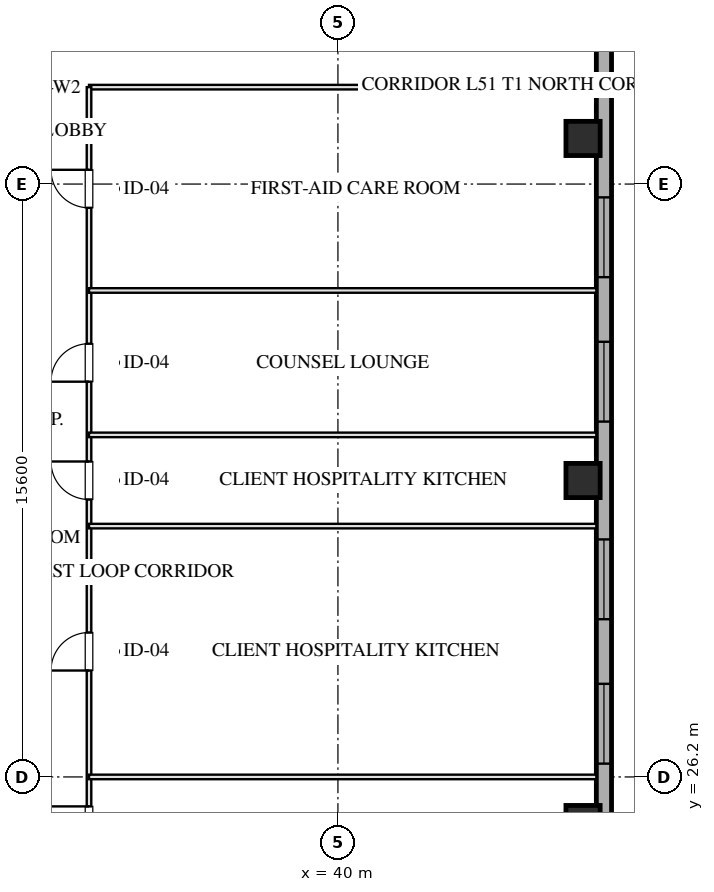
"""IFC4 building model, lengths in metres.
Left out: names, types, materials, properties, quantities, classifications, styles, units other than length and angle.
Written with IfcOpenShell. Run it as: python <this file> out.ifc"""

import sys

from ifc_helpers import new_model, si_unit, direction, frame, frame_2d, origin, origin_2d, place, context, subcontext, project, spatial, rectangle, hollow_rectangle, extrude, element, fill, save


model = new_model("IFC4")
c1 = context("Model", 3, precision=1e-05, world=origin(), true_north=direction((0.0, 1.0)))
c2 = subcontext(c1, "Body", "Model", "MODEL_VIEW")
j1 = project(units=[si_unit("LENGTHUNIT", "METRE"), si_unit("PLANEANGLEUNIT", "RADIAN")], contexts=[c1])
p1 = place(None, origin())
s1 = spatial("IfcSite", under=j1, at=p1, CompositionType="ELEMENT")
p2 = place(p1, origin())
s2 = spatial("IfcBuilding", under=s1, at=p2, CompositionType="ELEMENT")
p3 = place(p2, frame((0.0, 0.0, 192.05)))
s3 = spatial("IfcBuildingStorey", under=s2, at=p3, CompositionType="ELEMENT", Elevation=192.05)
for number, where, z_axis, x_axis in (
    (1, (46.45, 25.0, 0.0), (0.0, 0.0, 1.0), (1.0, 0.0, 0.0)),
    (2, (46.45, 34.0, 0.0), (0.0, 0.0, 1.0), (1.0, 0.0, 0.0)),
    (3, (46.45, 43.0, 0.0), (0.0, 0.0, 1.0), (1.0, 0.0, 0.0)),
):
    element("IfcColumn", number, at=place(p3, frame(where, z_axis=z_axis, x_axis=x_axis)), inside=s3, PredefinedType="COLUMN", context=c2, shape_type="SweptSolid", body=[
        extrude(hollow_rectangle(XDim=0.9, YDim=0.9, WallThickness=0.032, at=origin_2d()), origin(), (0.0, 0.0, 1.0), 3.451),
    ])
p4 = place(p3, frame((47.0, 57.2, 0.0), z_axis=(0.0, 0.0, 1.0), x_axis=(0.0, -1.0, 0.0)))
e4 = element("IfcWall", 4, at=p4, inside=s3, PredefinedType="SOLIDWALL", context=c2, shape_type="SweptSolid", body=[
    extrude(rectangle(XDim=46.4, YDim=0.4, at=frame_2d((23.2, 0.0))), origin(), (0.0, 0.0, 1.0), 2.61),
])
p5 = place(p4, frame((28.55, 0.0, 0.75)))
e5 = element("IfcOpeningElement", 5, at=p5, cuts=e4, PredefinedType="OPENING", context=c2, shape_type="SweptSolid", body=[
    extrude(rectangle(XDim=2.1, YDim=1.46, at=frame_2d((1.05, 0.73))), frame((0.0, 0.21, 0.0), z_axis=(0.0, -1.0, 0.0), x_axis=(1.0, 0.0, 0.0)), (0.0, 0.0, 1.0), 0.42),
])
p6 = place(p4, frame((24.75, 0.0, 0.75)))
e6 = element("IfcOpeningElement", 6, at=p6, cuts=e4, PredefinedType="OPENING", context=c2, shape_type="SweptSolid", body=[
    extrude(rectangle(XDim=2.1, YDim=1.46, at=frame_2d((1.05, 0.73))), frame((0.0, 0.21, 0.0), z_axis=(0.0, -1.0, 0.0), x_axis=(1.0, 0.0, 0.0)), (0.0, 0.0, 1.0), 0.42),
])
p7 = place(p4, frame((19.55, 0.0, 0.75)))
e7 = element("IfcOpeningElement", 7, at=p7, cuts=e4, PredefinedType="OPENING", context=c2, shape_type="SweptSolid", body=[
    extrude(rectangle(XDim=2.1, YDim=1.46, at=frame_2d((1.05, 0.73))), frame((0.0, 0.21, 0.0), z_axis=(0.0, -1.0, 0.0), x_axis=(1.0, 0.0, 0.0)), (0.0, 0.0, 1.0), 0.42),
])
p8 = place(p4, frame((15.75, 0.0, 0.75)))
e8 = element("IfcOpeningElement", 8, at=p8, cuts=e4, PredefinedType="OPENING", context=c2, shape_type="SweptSolid", body=[
    extrude(rectangle(XDim=2.1, YDim=1.46, at=frame_2d((1.05, 0.73))), frame((0.0, 0.21, 0.0), z_axis=(0.0, -1.0, 0.0), x_axis=(1.0, 0.0, 0.0)), (0.0, 0.0, 1.0), 0.42),
])
p9 = place(p3, frame((33.45, 44.35, 0.0), z_axis=(0.0, 0.0, 1.0), x_axis=(1.0, 0.0, 0.0)))
e9 = element("IfcWall", 9, at=p9, inside=s3, PredefinedType="PARTITIONING", context=c2, shape_type="SweptSolid", body=[
    extrude(rectangle(XDim=13.35, YDim=0.12, at=frame_2d((6.675, 0.0))), origin(), (0.0, 0.0, 1.0), 3.175),
])
p10 = place(p3, frame((33.45, 23.65, 0.0), z_axis=(0.0, 0.0, 1.0), x_axis=(0.0, 1.0, 0.0)))
e10 = element("IfcWall", 10, at=p10, inside=s3, PredefinedType="PARTITIONING", context=c2, shape_type="SweptSolid", body=[
    extrude(rectangle(XDim=20.7, YDim=0.12, at=frame_2d((10.35, 0.0))), origin(), (0.0, 0.0, 1.0), 3.175),
])
p11 = place(p10, frame((0.775, 0.0, 0.0)))
e11 = element("IfcOpeningElement", 11, at=p11, cuts=e10, PredefinedType="OPENING", context=c2, shape_type="SweptSolid", body=[
    extrude(rectangle(XDim=1.0, YDim=2.05, at=frame_2d((0.5, 1.025))), frame((0.0, 0.07, 0.0), z_axis=(0.0, -1.0, 0.0), x_axis=(1.0, 0.0, 0.0)), (0.0, 0.0, 1.0), 0.14),
])
p12 = place(p10, frame((5.35, 0.0, 0.0)))
e12 = element("IfcOpeningElement", 12, at=p12, cuts=e10, PredefinedType="OPENING", context=c2, shape_type="SweptSolid", body=[
    extrude(rectangle(XDim=1.0, YDim=2.05, at=frame_2d((0.5, 1.025))), frame((0.0, 0.07, 0.0), z_axis=(0.0, -1.0, 0.0), x_axis=(1.0, 0.0, 0.0)), (0.0, 0.0, 1.0), 0.14),
])
p13 = place(p10, frame((9.85, 0.0, 0.0)))
e13 = element("IfcOpeningElement", 13, at=p13, cuts=e10, PredefinedType="OPENING", context=c2, shape_type="SweptSolid", body=[
    extrude(rectangle(XDim=1.0, YDim=2.05, at=frame_2d((0.5, 1.025))), frame((0.0, 0.07, 0.0), z_axis=(0.0, -1.0, 0.0), x_axis=(1.0, 0.0, 0.0)), (0.0, 0.0, 1.0), 0.14),
])
p14 = place(p10, frame((12.95, 0.0, 0.0)))
e14 = element("IfcOpeningElement", 14, at=p14, cuts=e10, PredefinedType="OPENING", context=c2, shape_type="SweptSolid", body=[
    extrude(rectangle(XDim=1.0, YDim=2.05, at=frame_2d((0.5, 1.025))), frame((0.0, 0.07, 0.0), z_axis=(0.0, -1.0, 0.0), x_axis=(1.0, 0.0, 0.0)), (0.0, 0.0, 1.0), 0.14),
])
p15 = place(p10, frame((17.525, 0.0, 0.0)))
e15 = element("IfcOpeningElement", 15, at=p15, cuts=e10, PredefinedType="OPENING", context=c2, shape_type="SweptSolid", body=[
    extrude(rectangle(XDim=1.0, YDim=2.05, at=frame_2d((0.5, 1.025))), frame((0.0, 0.07, 0.0), z_axis=(0.0, -1.0, 0.0), x_axis=(1.0, 0.0, 0.0)), (0.0, 0.0, 1.0), 0.14),
])
for number, where, z_axis, x_axis in (
    (16, (33.45, 26.2, 0.0), (0.0, 0.0, 1.0), (1.0, 0.0, 0.0)),
    (17, (33.45, 32.8, 0.0), (0.0, 0.0, 1.0), (1.0, 0.0, 0.0)),
    (18, (33.45, 35.2, 0.0), (0.0, 0.0, 1.0), (1.0, 0.0, 0.0)),
    (19, (33.45, 39.0, 0.0), (0.0, 0.0, 1.0), (1.0, 0.0, 0.0)),
):
    element("IfcWall", number, at=place(p3, frame(where, z_axis=z_axis, x_axis=x_axis)), inside=s3, PredefinedType="PARTITIONING", context=c2, shape_type="SweptSolid", body=[
        extrude(rectangle(XDim=13.35, YDim=0.12, at=frame_2d((6.675, 0.0))), origin(), (0.0, 0.0, 1.0), 3.175),
    ])
p16 = place(p5, origin())
e20 = element("IfcWindow", 20, at=p16, inside=s3, PartitioningType="TRIPLE_PANEL_VERTICAL", PredefinedType="WINDOW", context=c2, shape_type="SweptSolid", body=[
    extrude(rectangle(XDim=2.1, YDim=1.46, at=frame_2d((1.05, 0.73))), frame((0.0, 0.03, 0.0), z_axis=(0.0, -1.0, 0.0), x_axis=(1.0, 0.0, 0.0)), (0.0, 0.0, 1.0), 0.06),
])
fill(e5, e20)
p17 = place(p6, origin())
e21 = element("IfcWindow", 21, at=p17, inside=s3, PartitioningType="TRIPLE_PANEL_VERTICAL", PredefinedType="WINDOW", context=c2, shape_type="SweptSolid", body=[
    extrude(rectangle(XDim=2.1, YDim=1.46, at=frame_2d((1.05, 0.73))), frame((0.0, 0.03, 0.0), z_axis=(0.0, -1.0, 0.0), x_axis=(1.0, 0.0, 0.0)), (0.0, 0.0, 1.0), 0.06),
])
fill(e6, e21)
p18 = place(p7, origin())
e22 = element("IfcWindow", 22, at=p18, inside=s3, PartitioningType="TRIPLE_PANEL_VERTICAL", PredefinedType="WINDOW", context=c2, shape_type="SweptSolid", body=[
    extrude(rectangle(XDim=2.1, YDim=1.46, at=frame_2d((1.05, 0.73))), frame((0.0, 0.03, 0.0), z_axis=(0.0, -1.0, 0.0), x_axis=(1.0, 0.0, 0.0)), (0.0, 0.0, 1.0), 0.06),
])
fill(e7, e22)
p19 = place(p8, origin())
e23 = element("IfcWindow", 23, at=p19, inside=s3, PartitioningType="TRIPLE_PANEL_VERTICAL", PredefinedType="WINDOW", context=c2, shape_type="SweptSolid", body=[
    extrude(rectangle(XDim=2.1, YDim=1.46, at=frame_2d((1.05, 0.73))), frame((0.0, 0.03, 0.0), z_axis=(0.0, -1.0, 0.0), x_axis=(1.0, 0.0, 0.0)), (0.0, 0.0, 1.0), 0.06),
])
fill(e8, e23)
p20 = place(p11, origin())
e24 = element("IfcDoor", 24, at=p20, inside=s3, OperationType="SINGLE_SWING_RIGHT", PredefinedType="DOOR", context=c2, shape_type="SweptSolid", body=[
    extrude(rectangle(XDim=1.0, YDim=2.05, at=frame_2d((0.5, 1.025))), frame((0.0, 0.025, 0.0), z_axis=(0.0, -1.0, 0.0), x_axis=(1.0, 0.0, 0.0)), (0.0, 0.0, 1.0), 0.05),
])
fill(e11, e24)
p21 = place(p12, origin())
e25 = element("IfcDoor", 25, at=p21, inside=s3, OperationType="SINGLE_SWING_LEFT", PredefinedType="DOOR", context=c2, shape_type="SweptSolid", body=[
    extrude(rectangle(XDim=1.0, YDim=2.05, at=frame_2d((0.5, 1.025))), frame((0.0, 0.025, 0.0), z_axis=(0.0, -1.0, 0.0), x_axis=(1.0, 0.0, 0.0)), (0.0, 0.0, 1.0), 0.05),
])
fill(e12, e25)
p22 = place(p13, origin())
e26 = element("IfcDoor", 26, at=p22, inside=s3, OperationType="SINGLE_SWING_RIGHT", PredefinedType="DOOR", context=c2, shape_type="SweptSolid", body=[
    extrude(rectangle(XDim=1.0, YDim=2.05, at=frame_2d((0.5, 1.025))), frame((0.0, 0.025, 0.0), z_axis=(0.0, -1.0, 0.0), x_axis=(1.0, 0.0, 0.0)), (0.0, 0.0, 1.0), 0.05),
])
fill(e13, e26)
p23 = place(p14, origin())
e27 = element("IfcDoor", 27, at=p23, inside=s3, OperationType="SINGLE_SWING_LEFT", PredefinedType="DOOR", context=c2, shape_type="SweptSolid", body=[
    extrude(rectangle(XDim=1.0, YDim=2.05, at=frame_2d((0.5, 1.025))), frame((0.0, 0.025, 0.0), z_axis=(0.0, -1.0, 0.0), x_axis=(1.0, 0.0, 0.0)), (0.0, 0.0, 1.0), 0.05),
])
fill(e14, e27)
p24 = place(p15, origin())
e28 = element("IfcDoor", 28, at=p24, inside=s3, OperationType="SINGLE_SWING_RIGHT", PredefinedType="DOOR", context=c2, shape_type="SweptSolid", body=[
    extrude(rectangle(XDim=1.0, YDim=2.05, at=frame_2d((0.5, 1.025))), frame((0.0, 0.025, 0.0), z_axis=(0.0, -1.0, 0.0), x_axis=(1.0, 0.0, 0.0)), (0.0, 0.0, 1.0), 0.05),
])
fill(e15, e28)
save(model, sys.argv[1])
